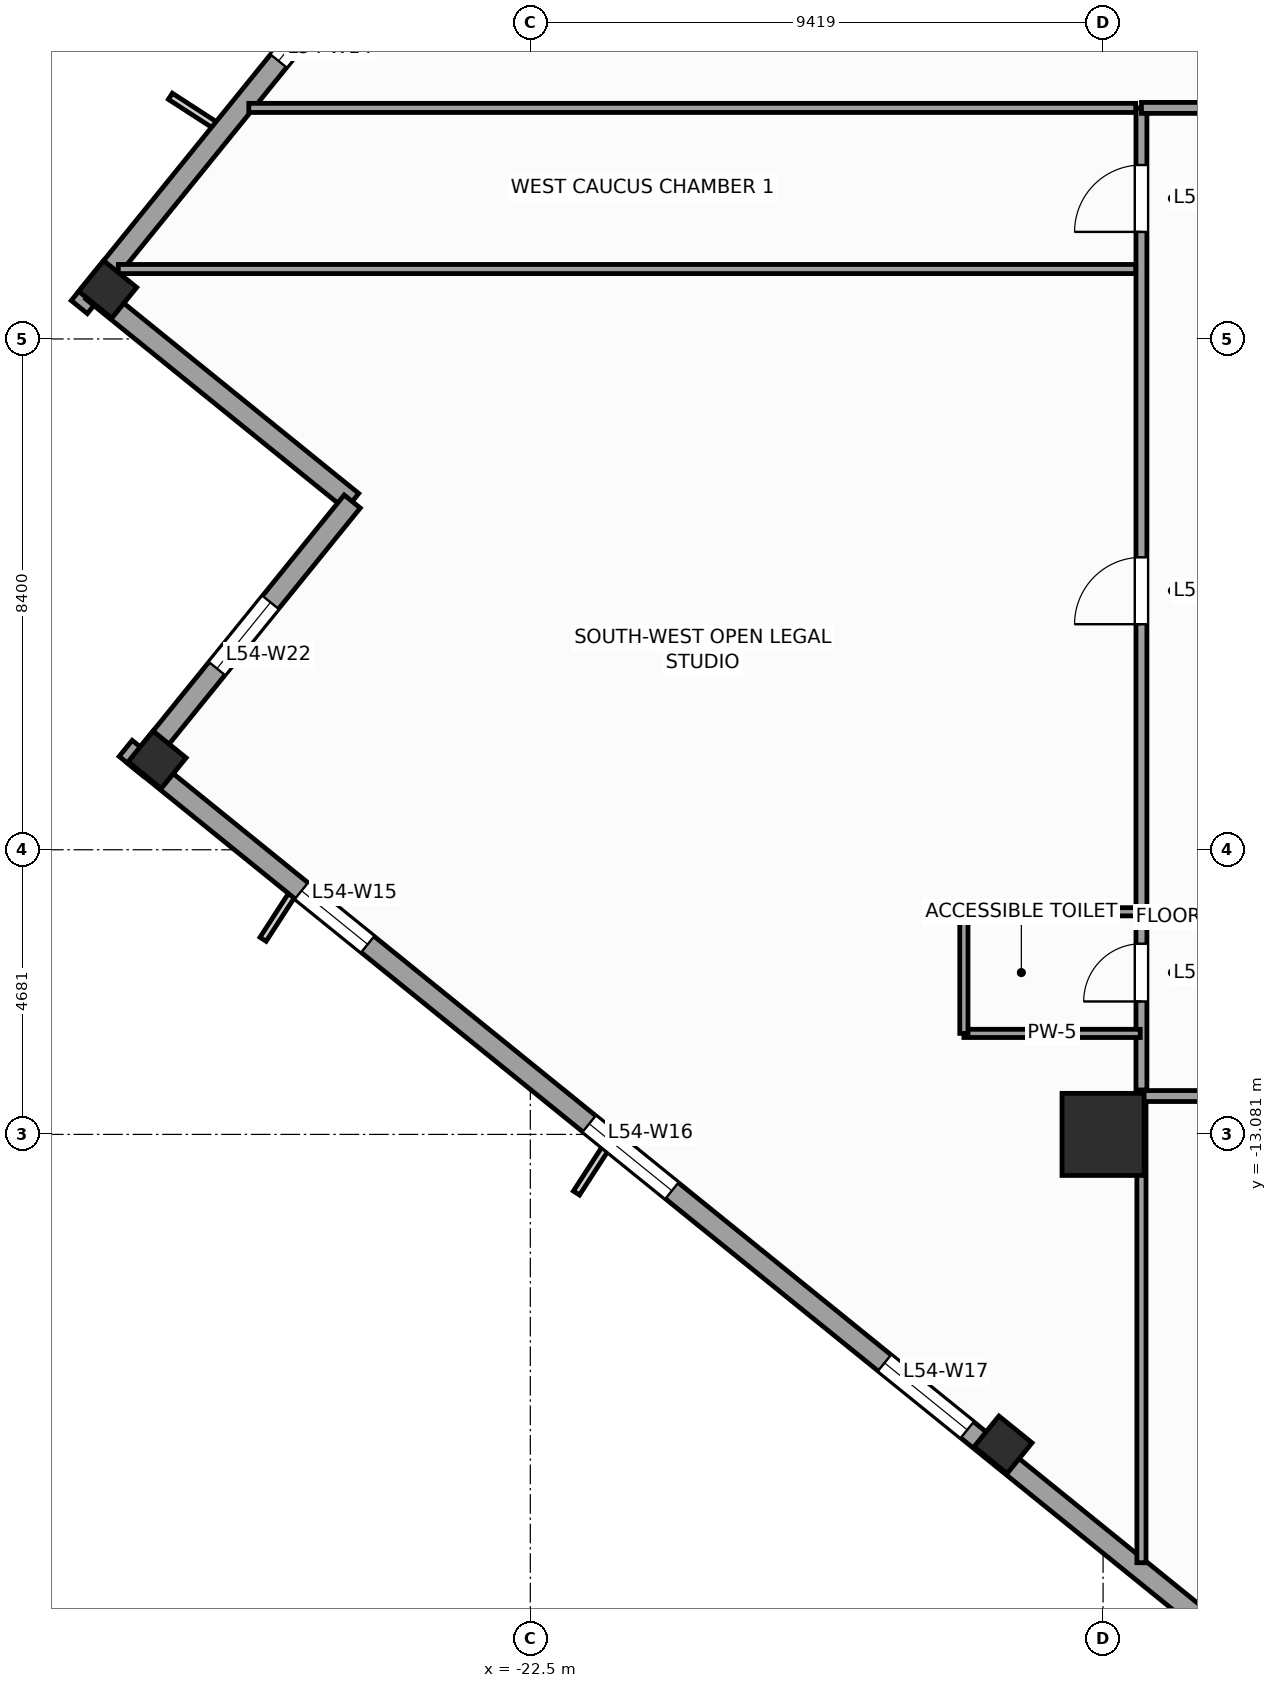
"""IFC4 building model, lengths in metres.
Left out: names, types, materials, properties, quantities, classifications, styles, units other than length and angle.
Written with IfcOpenShell. Run it as: python <this file> out.ifc"""

import sys

from ifc_helpers import new_model, si_unit, direction, frame, frame_2d, origin, origin_2d, place, context, subcontext, project, spatial, rectangle, extrude, source, transform, mapped, element, fill, save


model = new_model("IFC4")
c1 = context("Model", 3, precision=1e-05, world=origin(), true_north=direction((0.0, 1.0)))
c2 = subcontext(c1, "Body", "Model", "MODEL_VIEW")
j1 = project(units=[si_unit("LENGTHUNIT", "METRE"), si_unit("PLANEANGLEUNIT", "RADIAN")], contexts=[c1])
p1 = place(None, origin())
s1 = spatial("IfcSite", under=j1, at=p1, CompositionType="ELEMENT")
p2 = place(p1, origin())
s2 = spatial("IfcBuilding", under=s1, at=p2, CompositionType="ELEMENT")
p3 = place(p2, frame((0.0, 0.0, 225.1)))
s3 = spatial("IfcBuildingStorey", under=s2, at=p3, CompositionType="ELEMENT", Elevation=225.1)
m1 = source(origin(), c2, "Body", "SweptSolid", [
    extrude(rectangle(XDim=1.35, YDim=1.35, at=origin_2d()), origin(), (0.0, 0.0, 1.0), 3.9),
])
p4 = place(p3, frame((-13.081, -13.081, 0.0), z_axis=(0.0, 0.0, 1.0), x_axis=(1.0, 0.0, 0.0)))
e1 = element("IfcColumn", 1, at=p4, inside=s3, PredefinedType="COLUMN", context=c2, shape_type="MappedRepresentation", body=[
    mapped(m1, transform((0.0, 0.0, 0.0), scale=1.0)),
])
m2 = source(origin(), c2, "Body", "SweptSolid", [
    extrude(rectangle(XDim=0.65, YDim=0.7, at=origin_2d()), origin(), (0.0, 0.0, 1.0), 3.9),
])
for number, where, z_axis, x_axis in (
    (2, (-29.45, 0.815, 0.0), (0.0, 0.0, 1.0), (0.629, 0.777, 0.0)),
    (3, (-28.637, -6.92, 0.0), (0.0, 0.0, 1.0), (0.629, 0.777, 0.0)),
    (4, (-14.726, -18.185, 0.0), (0.0, 0.0, 1.0), (0.629, 0.777, 0.0)),
):
    element("IfcColumn", number, at=place(p3, frame(where, z_axis=z_axis, x_axis=x_axis)), inside=s3, PredefinedType="COLUMN", context=c2, shape_type="MappedRepresentation", body=[
        mapped(m2, transform((0.0, 0.0, 0.0), scale=1.0)),
    ])
p5 = place(p3, frame((-6.733, 29.154, 0.0), z_axis=(0.0, 0.0, 1.0), x_axis=(-0.629325378072, -0.77714192302, 0.0)))
e5 = element("IfcWall", 5, at=p5, inside=s3, PredefinedType="STANDARD", context=c2, shape_type="SweptSolid", body=[
    extrude(rectangle(XDim=36.84, YDim=0.34, at=frame_2d((18.42, 0.0))), origin(), (0.0, 0.0, 1.0), 2.96),
])
p6 = place(p5, frame((12.295, 0.0, 0.0)))
e6 = element("IfcOpeningElement", 6, at=p6, cuts=e5, PredefinedType="OPENING", context=c2, shape_type="SweptSolid", body=[
    extrude(rectangle(XDim=1.05, YDim=2.25, at=frame_2d((0.525, 1.125))), frame((0.0, 0.18, 0.0), z_axis=(0.0, -1.0, 0.0), x_axis=(1.0, 0.0, 0.0)), (0.0, 0.0, 1.0), 0.36),
])
p7 = place(p5, frame((3.721, 0.0, 0.48)))
e7 = element("IfcOpeningElement", 7, at=p7, cuts=e5, PredefinedType="OPENING", context=c2, shape_type="SweptSolid", body=[
    extrude(rectangle(XDim=1.4, YDim=2.4, at=frame_2d((0.7, 1.2))), frame((0.0, 0.18, 0.0), z_axis=(0.0, -1.0, 0.0), x_axis=(1.0, 0.0, 0.0)), (0.0, 0.0, 1.0), 0.36),
])
p8 = place(p5, frame((9.059, 0.0, 0.58)))
e8 = element("IfcOpeningElement", 8, at=p8, cuts=e5, PredefinedType="OPENING", context=c2, shape_type="SweptSolid", body=[
    extrude(rectangle(XDim=1.75, YDim=2.3, at=frame_2d((0.875, 1.15))), frame((0.0, 0.18, 0.0), z_axis=(0.0, -1.0, 0.0), x_axis=(1.0, 0.0, 0.0)), (0.0, 0.0, 1.0), 0.36),
])
p9 = place(p5, frame((16.058, 0.0, 0.58)))
e9 = element("IfcOpeningElement", 9, at=p9, cuts=e5, PredefinedType="OPENING", context=c2, shape_type="SweptSolid", body=[
    extrude(rectangle(XDim=1.75, YDim=2.3, at=frame_2d((0.875, 1.15))), frame((0.0, 0.18, 0.0), z_axis=(0.0, -1.0, 0.0), x_axis=(1.0, 0.0, 0.0)), (0.0, 0.0, 1.0), 0.36),
])
p10 = place(p5, frame((24.176, 0.0, 0.58)))
e10 = element("IfcOpeningElement", 10, at=p10, cuts=e5, PredefinedType="OPENING", context=c2, shape_type="SweptSolid", body=[
    extrude(rectangle(XDim=1.75, YDim=2.3, at=frame_2d((0.875, 1.15))), frame((0.0, 0.18, 0.0), z_axis=(0.0, -1.0, 0.0), x_axis=(1.0, 0.0, 0.0)), (0.0, 0.0, 1.0), 0.36),
])
p11 = place(p5, frame((30.232, 0.0, 0.48)))
e11 = element("IfcOpeningElement", 11, at=p11, cuts=e5, PredefinedType="OPENING", context=c2, shape_type="SweptSolid", body=[
    extrude(rectangle(XDim=1.4, YDim=2.4, at=frame_2d((0.7, 1.2))), frame((0.0, 0.18, 0.0), z_axis=(0.0, -1.0, 0.0), x_axis=(1.0, 0.0, 0.0)), (0.0, 0.0, 1.0), 0.36),
])
p12 = place(p3, frame((-29.703, 0.789, 0.0), z_axis=(0.0, 0.0, 1.0), x_axis=(0.77714355312, -0.629323365087, 0.0)))
e12 = element("IfcWall", 12, at=p12, inside=s3, PredefinedType="STANDARD", context=c2, shape_type="SweptSolid", body=[
    extrude(rectangle(XDim=5.5, YDim=0.34, at=frame_2d((2.75, 0.0))), origin(), (0.0, 0.0, 1.0), 3.66),
])
p13 = place(p3, frame((-25.429, -2.673, 0.0), z_axis=(0.0, 0.0, 1.0), x_axis=(-0.629299794138, -0.777162640055, 0.0)))
e13 = element("IfcWall", 13, at=p13, inside=s3, PredefinedType="STANDARD", context=c2, shape_type="SweptSolid", body=[
    extrude(rectangle(XDim=5.67, YDim=0.34, at=frame_2d((2.835, 0.0))), origin(), (0.0, 0.0, 1.0), 3.66),
])
p14 = place(p13, frame((2.135, 0.0, 0.48)))
e14 = element("IfcOpeningElement", 14, at=p14, cuts=e13, PredefinedType="OPENING", context=c2, shape_type="SweptSolid", body=[
    extrude(rectangle(XDim=1.4, YDim=2.4, at=frame_2d((0.7, 1.2))), frame((0.0, 0.18, 0.0), z_axis=(0.0, -1.0, 0.0), x_axis=(1.0, 0.0, 0.0)), (0.0, 0.0, 1.0), 0.36),
])
p15 = place(p3, frame((-29.154, -6.733, 0.0), z_axis=(0.0, 0.0, 1.0), x_axis=(0.77714192302, -0.629325378072, 0.0)))
e15 = element("IfcWall", 15, at=p15, inside=s3, PredefinedType="STANDARD", context=c2, shape_type="SweptSolid", body=[
    extrude(rectangle(XDim=36.84, YDim=0.34, at=frame_2d((18.42, 0.0))), origin(), (0.0, 0.0, 1.0), 2.96),
])
p16 = place(p15, frame((3.721, 0.0, 0.48)))
e16 = element("IfcOpeningElement", 16, at=p16, cuts=e15, PredefinedType="OPENING", context=c2, shape_type="SweptSolid", body=[
    extrude(rectangle(XDim=1.4, YDim=2.4, at=frame_2d((0.7, 1.2))), frame((0.0, 0.18, 0.0), z_axis=(0.0, -1.0, 0.0), x_axis=(1.0, 0.0, 0.0)), (0.0, 0.0, 1.0), 0.36),
])
p17 = place(p15, frame((9.809, 0.0, 0.58)))
e17 = element("IfcOpeningElement", 17, at=p17, cuts=e15, PredefinedType="OPENING", context=c2, shape_type="SweptSolid", body=[
    extrude(rectangle(XDim=1.75, YDim=2.3, at=frame_2d((0.875, 1.15))), frame((0.0, 0.18, 0.0), z_axis=(0.0, -1.0, 0.0), x_axis=(1.0, 0.0, 0.0)), (0.0, 0.0, 1.0), 0.36),
])
p18 = place(p15, frame((16.058, 0.0, 0.58)))
e18 = element("IfcOpeningElement", 18, at=p18, cuts=e15, PredefinedType="OPENING", context=c2, shape_type="SweptSolid", body=[
    extrude(rectangle(XDim=1.75, YDim=2.3, at=frame_2d((0.875, 1.15))), frame((0.0, 0.18, 0.0), z_axis=(0.0, -1.0, 0.0), x_axis=(1.0, 0.0, 0.0)), (0.0, 0.0, 1.0), 0.36),
])
p19 = place(p15, frame((24.176, 0.0, 0.58)))
e19 = element("IfcOpeningElement", 19, at=p19, cuts=e15, PredefinedType="OPENING", context=c2, shape_type="SweptSolid", body=[
    extrude(rectangle(XDim=1.75, YDim=2.3, at=frame_2d((0.875, 1.15))), frame((0.0, 0.18, 0.0), z_axis=(0.0, -1.0, 0.0), x_axis=(1.0, 0.0, 0.0)), (0.0, 0.0, 1.0), 0.36),
])
p20 = place(p15, frame((30.982, 0.0, 0.48)))
e20 = element("IfcOpeningElement", 20, at=p20, cuts=e15, PredefinedType="OPENING", context=c2, shape_type="SweptSolid", body=[
    extrude(rectangle(XDim=1.4, YDim=2.4, at=frame_2d((0.7, 1.2))), frame((0.0, 0.18, 0.0), z_axis=(0.0, -1.0, 0.0), x_axis=(1.0, 0.0, 0.0)), (0.0, 0.0, 1.0), 0.36),
])
p21 = place(p3, frame((-12.45, -12.45, 0.0), z_axis=(0.0, 0.0, 1.0), x_axis=(1.0, 0.0, 0.0)))
e21 = element("IfcWall", 21, at=p21, inside=s3, PredefinedType="PARTITIONING", context=c2, shape_type="SweptSolid", body=[
    extrude(rectangle(XDim=24.9, YDim=0.18, at=frame_2d((12.45, 0.0))), origin(), (0.0, 0.0, 1.0), 3.66),
])
p22 = place(p21, frame((4.839, 0.0, 0.0)))
e22 = element("IfcOpeningElement", 22, at=p22, cuts=e21, PredefinedType="OPENING", context=c2, shape_type="SweptSolid", body=[
    extrude(rectangle(XDim=1.1, YDim=2.2, at=frame_2d((0.55, 1.1))), frame((0.0, 0.1, 0.0), z_axis=(0.0, -1.0, 0.0), x_axis=(1.0, 0.0, 0.0)), (0.0, 0.0, 1.0), 0.2),
])
p23 = place(p21, frame((13.15, 0.0, 0.0)))
e23 = element("IfcOpeningElement", 23, at=p23, cuts=e21, PredefinedType="OPENING", context=c2, shape_type="SweptSolid", body=[
    extrude(rectangle(XDim=1.1, YDim=2.2, at=frame_2d((0.55, 1.1))), frame((0.0, 0.1, 0.0), z_axis=(0.0, -1.0, 0.0), x_axis=(1.0, 0.0, 0.0)), (0.0, 0.0, 1.0), 0.2),
])
p24 = place(p21, frame((20.21, 0.0, 0.0)))
e24 = element("IfcOpeningElement", 24, at=p24, cuts=e21, PredefinedType="OPENING", context=c2, shape_type="SweptSolid", body=[
    extrude(rectangle(XDim=1.1, YDim=2.2, at=frame_2d((0.55, 1.1))), frame((0.0, 0.1, 0.0), z_axis=(0.0, -1.0, 0.0), x_axis=(1.0, 0.0, 0.0)), (0.0, 0.0, 1.0), 0.2),
])
p25 = place(p3, frame((-12.45, -12.35, 0.0), z_axis=(0.0, 0.0, 1.0), x_axis=(0.0, 1.0, 0.0)))
e25 = element("IfcWall", 25, at=p25, inside=s3, PredefinedType="PARTITIONING", context=c2, shape_type="SweptSolid", body=[
    extrude(rectangle(XDim=16.15, YDim=0.18, at=frame_2d((8.075, 0.0))), origin(), (0.0, 0.0, 1.0), 3.66),
])
p26 = place(p25, frame((1.455, 0.0, 0.0)))
e26 = element("IfcOpeningElement", 26, at=p26, cuts=e25, PredefinedType="OPENING", context=c2, shape_type="SweptSolid", body=[
    extrude(rectangle(XDim=0.95, YDim=2.1, at=frame_2d((0.475, 1.05))), frame((0.0, 0.1, 0.0), z_axis=(0.0, -1.0, 0.0), x_axis=(1.0, 0.0, 0.0)), (0.0, 0.0, 1.0), 0.2),
])
p27 = place(p25, frame((14.111, 0.0, 0.0)))
e27 = element("IfcOpeningElement", 27, at=p27, cuts=e25, PredefinedType="OPENING", context=c2, shape_type="SweptSolid", body=[
    extrude(rectangle(XDim=1.1, YDim=2.2, at=frame_2d((0.55, 1.1))), frame((0.0, 0.1, 0.0), z_axis=(0.0, -1.0, 0.0), x_axis=(1.0, 0.0, 0.0)), (0.0, 0.0, 1.0), 0.2),
])
p28 = place(p25, frame((7.659, 0.0, 0.0)))
e28 = element("IfcOpeningElement", 28, at=p28, cuts=e25, PredefinedType="OPENING", context=c2, shape_type="SweptSolid", body=[
    extrude(rectangle(XDim=1.1, YDim=2.2, at=frame_2d((0.55, 1.1))), frame((0.0, 0.1, 0.0), z_axis=(0.0, -1.0, 0.0), x_axis=(1.0, 0.0, 0.0)), (0.0, 0.0, 1.0), 0.2),
])
p29 = place(p3, frame((-12.45, 3.8, 0.0), z_axis=(0.0, 0.0, 1.0), x_axis=(1.0, 0.0, 0.0)))
e29 = element("IfcWall", 29, at=p29, inside=s3, PredefinedType="PARTITIONING", context=c2, shape_type="SweptSolid", body=[
    extrude(rectangle(XDim=3.9, YDim=0.18, at=frame_2d((1.95, 0.0))), origin(), (0.0, 0.0, 1.0), 3.66),
])
p30 = place(p29, frame((1.4, 0.0, 0.0)))
e30 = element("IfcOpeningElement", 30, at=p30, cuts=e29, PredefinedType="OPENING", context=c2, shape_type="SweptSolid", body=[
    extrude(rectangle(XDim=1.1, YDim=2.2, at=frame_2d((0.55, 1.1))), frame((0.0, 0.1, 0.0), z_axis=(0.0, -1.0, 0.0), x_axis=(1.0, 0.0, 0.0)), (0.0, 0.0, 1.0), 0.2),
])
p31 = place(p3, frame((-29.275, 1.15, 0.0), z_axis=(0.0, 0.0, 1.0), x_axis=(1.0, 0.0, 0.0)))
e31 = element("IfcWall", 31, at=p31, inside=s3, PredefinedType="PARTITIONING", context=c2, shape_type="SweptSolid", body=[
    extrude(rectangle(XDim=16.73, YDim=0.15, at=frame_2d((8.365, 0.0))), origin(), (0.0, 0.0, 1.0), 3.66),
])
p32 = place(p3, frame((-27.129, 3.8, 0.0), z_axis=(0.0, 0.0, 1.0), x_axis=(1.0, 0.0, 0.0)))
e32 = element("IfcWall", 32, at=p32, inside=s3, PredefinedType="PARTITIONING", context=c2, shape_type="SweptSolid", body=[
    extrude(rectangle(XDim=14.584, YDim=0.15, at=frame_2d((7.292, 0.0))), origin(), (0.0, 0.0, 1.0), 3.66),
])
p33 = place(p3, frame((-12.45, -20.125, 0.0), z_axis=(0.0, 0.0, 1.0), x_axis=(0.0, 1.0, 0.0)))
e33 = element("IfcWall", 33, at=p33, inside=s3, PredefinedType="PARTITIONING", context=c2, shape_type="SweptSolid", body=[
    extrude(rectangle(XDim=7.58, YDim=0.15, at=frame_2d((3.79, 0.0))), origin(), (0.0, 0.0, 1.0), 3.66),
])
for number, where, z_axis, x_axis in (
    (34, (-15.37, -11.42, 0.0), (0.0, 0.0, 1.0), (1.0, 0.0, 0.0)),
    (35, (-15.37, -9.42, 0.0), (0.0, 0.0, 1.0), (1.0, 0.0, 0.0)),
):
    element("IfcWall", number, at=place(p3, frame(where, z_axis=z_axis, x_axis=x_axis)), inside=s3, PredefinedType="PARTITIONING", context=c2, shape_type="SweptSolid", body=[
        extrude(rectangle(XDim=2.9, YDim=0.135, at=frame_2d((1.45, 0.0))), origin(), (0.0, 0.0, 1.0), 3.66),
    ])
p34 = place(p3, frame((-15.37, -11.42, 0.0), z_axis=(0.0, 0.0, 1.0), x_axis=(0.0, 1.0, 0.0)))
e36 = element("IfcWall", 36, at=p34, inside=s3, PredefinedType="PARTITIONING", context=c2, shape_type="SweptSolid", body=[
    extrude(rectangle(XDim=2.0, YDim=0.135, at=frame_2d((1.0, 0.0))), origin(), (0.0, 0.0, 1.0), 3.66),
])
m3 = source(origin(), c2, "Body", "SweptSolid", [
    extrude(rectangle(XDim=1.4, YDim=2.4, at=frame_2d((0.7, 1.2))), frame((0.0, 0.03, 0.0), z_axis=(0.0, -1.0, 0.0), x_axis=(1.0, 0.0, 0.0)), (0.0, 0.0, 1.0), 0.06),
])
p35 = place(p11, origin())
e37 = element("IfcWindow", 37, at=p35, inside=s3, PartitioningType="SINGLE_PANEL", PredefinedType="WINDOW", context=c2, shape_type="MappedRepresentation", body=[
    mapped(m3, transform((0.0, 0.0, 0.0), scale=1.0)),
])
fill(e11, e37)
p36 = place(p16, origin())
e38 = element("IfcWindow", 38, at=p36, inside=s3, PartitioningType="SINGLE_PANEL", PredefinedType="WINDOW", context=c2, shape_type="MappedRepresentation", body=[
    mapped(m3, transform((0.0, 0.0, 0.0), scale=1.0)),
])
fill(e16, e38)
m4 = source(origin(), c2, "Body", "SweptSolid", [
    extrude(rectangle(XDim=1.75, YDim=2.3, at=frame_2d((0.875, 1.15))), frame((0.0, 0.03, 0.0), z_axis=(0.0, -1.0, 0.0), x_axis=(1.0, 0.0, 0.0)), (0.0, 0.0, 1.0), 0.06),
])
p37 = place(p17, origin())
e39 = element("IfcWindow", 39, at=p37, inside=s3, PartitioningType="SINGLE_PANEL", PredefinedType="WINDOW", context=c2, shape_type="MappedRepresentation", body=[
    mapped(m4, transform((0.0, 0.0, 0.0), scale=1.0)),
])
fill(e17, e39)
p38 = place(p18, origin())
e40 = element("IfcWindow", 40, at=p38, inside=s3, PartitioningType="SINGLE_PANEL", PredefinedType="WINDOW", context=c2, shape_type="MappedRepresentation", body=[
    mapped(m4, transform((0.0, 0.0, 0.0), scale=1.0)),
])
fill(e18, e40)
p39 = place(p14, origin())
e41 = element("IfcWindow", 41, at=p39, inside=s3, PartitioningType="SINGLE_PANEL", PredefinedType="WINDOW", context=c2, shape_type="MappedRepresentation", body=[
    mapped(m3, transform((0.0, 0.0, 0.0), scale=1.0)),
])
fill(e14, e41)
m5 = source(origin(), c2, "Body", "SweptSolid", [
    extrude(rectangle(XDim=0.95, YDim=2.1, at=frame_2d((0.475, 1.05))), frame((0.0, 0.025, 0.0), z_axis=(0.0, -1.0, 0.0), x_axis=(1.0, 0.0, 0.0)), (0.0, 0.0, 1.0), 0.05),
])
p40 = place(p26, origin())
e42 = element("IfcDoor", 42, at=p40, inside=s3, OperationType="SINGLE_SWING_LEFT", PredefinedType="DOOR", context=c2, shape_type="MappedRepresentation", body=[
    mapped(m5, transform((0.0, 0.0, 0.0), scale=1.0)),
])
fill(e26, e42)
m6 = source(origin(), c2, "Body", "SweptSolid", [
    extrude(rectangle(XDim=1.1, YDim=2.2, at=frame_2d((0.55, 1.1))), frame((0.0, 0.025, 0.0), z_axis=(0.0, -1.0, 0.0), x_axis=(1.0, 0.0, 0.0)), (0.0, 0.0, 1.0), 0.05),
])
p41 = place(p27, origin())
e43 = element("IfcDoor", 43, at=p41, inside=s3, OperationType="SINGLE_SWING_LEFT", PredefinedType="DOOR", context=c2, shape_type="MappedRepresentation", body=[
    mapped(m6, transform((0.0, 0.0, 0.0), scale=1.0)),
])
fill(e27, e43)
p42 = place(p28, origin())
e44 = element("IfcDoor", 44, at=p42, inside=s3, OperationType="SINGLE_SWING_LEFT", PredefinedType="DOOR", context=c2, shape_type="MappedRepresentation", body=[
    mapped(m6, transform((0.0, 0.0, 0.0), scale=1.0)),
])
fill(e28, e44)
save(model, sys.argv[1])
